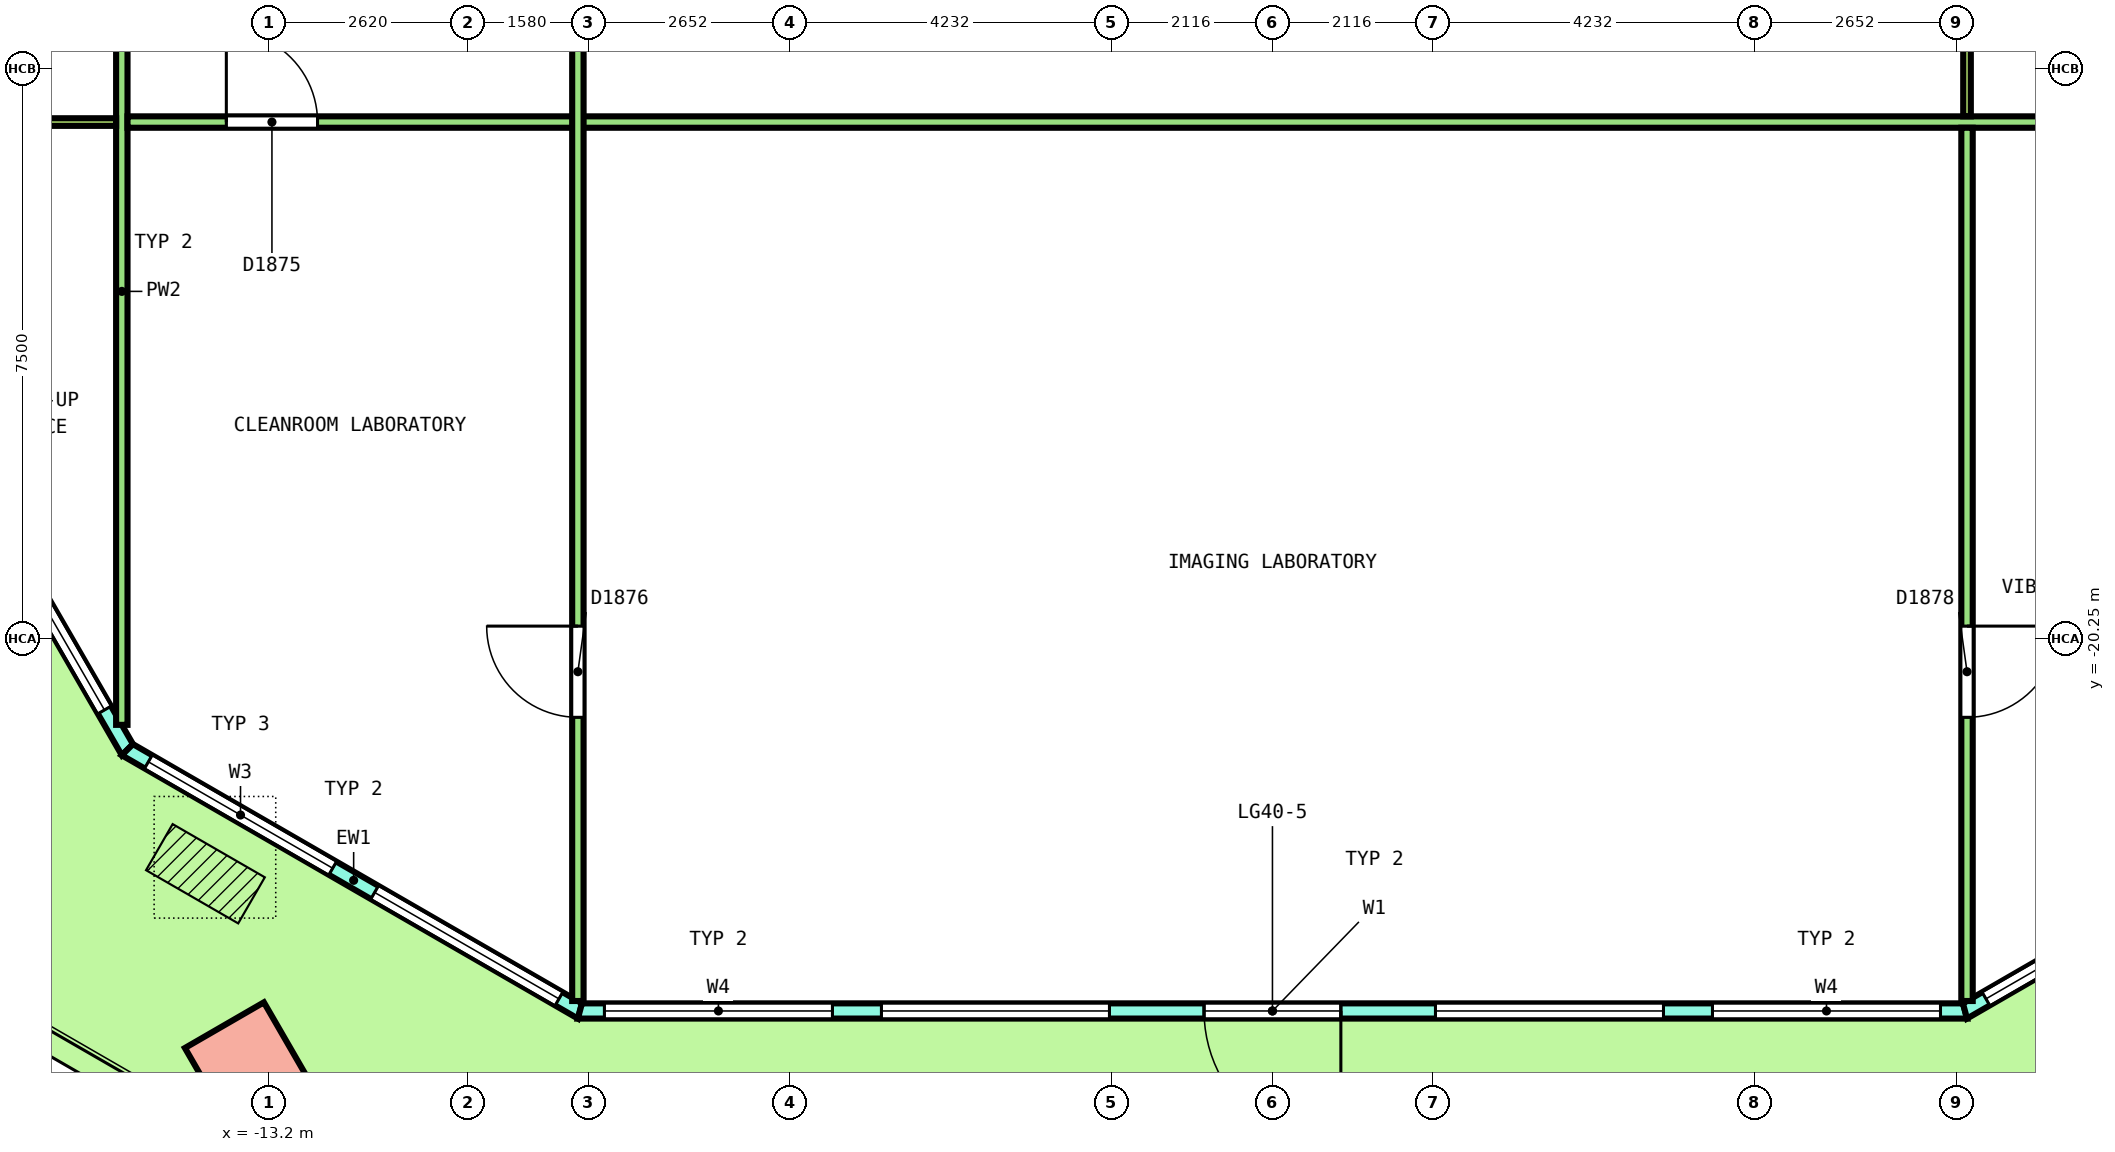
"""IFC4 building model, lengths in metres.
Left out: names, types, materials, properties, quantities, classifications, styles, units other than length and angle.
Written with IfcOpenShell. Run it as: python <this file> out.ifc"""

import sys

from ifc_helpers import new_model, si_unit, direction, frame, frame_2d, origin, origin_2d, place, context, subcontext, project, spatial, polyline, rectangle, outline, extrude, element, fill, save


model = new_model("IFC4")
c1 = context("Model", 3, precision=1e-05, world=origin(), true_north=direction((0.0, 1.0)))
c2 = subcontext(c1, "Body", "Model", "MODEL_VIEW")
j1 = project(units=[si_unit("LENGTHUNIT", "METRE"), si_unit("PLANEANGLEUNIT", "RADIAN")], contexts=[c1])
p1 = place(None, origin())
s1 = spatial("IfcSite", under=j1, at=p1, CompositionType="ELEMENT")
p2 = place(p1, origin())
s2 = spatial("IfcBuilding", under=s1, at=p2, CompositionType="ELEMENT")
p3 = place(p2, frame((0.0, 0.0, 184.8)))
s3 = spatial("IfcBuildingStorey", under=s2, at=p3, CompositionType="ELEMENT", Elevation=184.8)
p4 = place(p3, frame((-13.488, -25.851, 0.0), z_axis=(0.018132595726, -0.031445896907, 0.999340965106), x_axis=(0.865740985748, -0.499504693256, -0.031426215359)))
e1 = element("IfcColumn", 1, at=p4, inside=s3, PredefinedType="COLUMN", context=c2, shape_type="SweptSolid", body=[
    extrude(rectangle(XDim=1.2, YDim=1.2, at=origin_2d()), origin(), (0.0, 0.0, 1.0), 4.053),
])
p5 = place(p3, frame((-26.331, -2.193, 0.0), z_axis=(0.0, 0.0, 1.0), x_axis=(0.499998501835, -0.866026268748, 0.0)))
e2 = element("IfcWall", 2, at=p5, inside=s3, PredefinedType="SOLIDWALL", context=c2, shape_type="SweptSolid", body=[
    extrude(outline(polyline([(-0.027, -0.1), (1.0, -0.1), (2.027, -0.1), (3.053, -0.1), (4.08, -0.1), (5.106, -0.1), (6.133, -0.1), (7.16, -0.1), (8.187, -0.1), (9.213, -0.1), (10.24, -0.1), (11.267, -0.1), (12.293, -0.1), (13.32, -0.1), (14.347, -0.1), (15.373, -0.1), (16.4, -0.1), (17.427, -0.1), (18.453, -0.1), (19.48, -0.1), (20.507, -0.1), (21.533, -0.1), (22.56, -0.1), (22.506, 0.1), (21.485, 0.1), (20.463, 0.1), (19.441, 0.1), (18.419, 0.1), (17.397, 0.1), (16.375, 0.1), (15.354, 0.1), (14.332, 0.1), (13.31, 0.1), (12.288, 0.1), (11.267, 0.1), (10.245, 0.1), (9.223, 0.1), (8.201, 0.1), (7.179, 0.1), (6.158, 0.1), (5.136, 0.1), (4.114, 0.1), (3.092, 0.1), (2.071, 0.1), (1.049, 0.1), (0.027, 0.1), (-0.027, -0.1)])), origin(), (0.0, 0.0, 1.0), 4.1),
])
p6 = place(p5, frame((0.603, 0.0, 0.1)))
e3 = element("IfcOpeningElement", 3, at=p6, cuts=e2, PredefinedType="OPENING", context=c2, shape_type="SweptSolid", body=[
    extrude(rectangle(XDim=3.3, YDim=2.9, at=frame_2d((1.65, 1.45))), frame((0.0, 0.11, 0.0), z_axis=(0.0, -1.0, 0.0), x_axis=(1.0, 0.0, 0.0)), (0.0, 0.0, 1.0), 0.22),
])
p7 = place(p5, frame((5.11, 0.0, 0.1)))
e4 = element("IfcOpeningElement", 4, at=p7, cuts=e2, PredefinedType="OPENING", context=c2, shape_type="SweptSolid", body=[
    extrude(rectangle(XDim=3.3, YDim=2.9, at=frame_2d((1.65, 1.45))), frame((0.0, 0.11, 0.0), z_axis=(0.0, -1.0, 0.0), x_axis=(1.0, 0.0, 0.0)), (0.0, 0.0, 1.0), 0.22),
])
p8 = place(p5, frame((10.367, 0.0, 0.0)))
e5 = element("IfcOpeningElement", 5, at=p8, cuts=e2, PredefinedType="OPENING", context=c2, shape_type="SweptSolid", body=[
    extrude(rectangle(XDim=1.8, YDim=2.4, at=frame_2d((0.9, 1.2))), frame((0.0, 0.11, 0.0), z_axis=(0.0, -1.0, 0.0), x_axis=(1.0, 0.0, 0.0)), (0.0, 0.0, 1.0), 0.22),
])
p9 = place(p5, frame((10.367, 0.0, 2.55)))
e6 = element("IfcOpeningElement", 6, at=p9, cuts=e2, PredefinedType="OPENING", context=c2, shape_type="SweptSolid", body=[
    extrude(rectangle(XDim=1.8, YDim=0.45, at=frame_2d((0.9, 0.225))), frame((0.0, 0.11, 0.0), z_axis=(0.0, -1.0, 0.0), x_axis=(1.0, 0.0, 0.0)), (0.0, 0.0, 1.0), 0.22),
])
p10 = place(p5, frame((14.123, 0.0, 0.1)))
e7 = element("IfcOpeningElement", 7, at=p10, cuts=e2, PredefinedType="OPENING", context=c2, shape_type="SweptSolid", body=[
    extrude(rectangle(XDim=3.3, YDim=2.9, at=frame_2d((1.65, 1.45))), frame((0.0, 0.11, 0.0), z_axis=(0.0, -1.0, 0.0), x_axis=(1.0, 0.0, 0.0)), (0.0, 0.0, 1.0), 0.22),
])
p11 = place(p5, frame((18.63, 0.0, 0.1)))
e8 = element("IfcOpeningElement", 8, at=p11, cuts=e2, PredefinedType="OPENING", context=c2, shape_type="SweptSolid", body=[
    extrude(rectangle(XDim=3.3, YDim=2.9, at=frame_2d((1.65, 1.45))), frame((0.0, 0.11, 0.0), z_axis=(0.0, -1.0, 0.0), x_axis=(1.0, 0.0, 0.0)), (0.0, 0.0, 1.0), 0.22),
])
p12 = place(p3, frame((-15.065, -21.707, 0.0), z_axis=(0.0, 0.0, 1.0), x_axis=(0.866029458321, -0.49999297727, 0.0)))
e9 = element("IfcWall", 9, at=p12, inside=s3, PredefinedType="SOLIDWALL", context=c2, shape_type="SweptSolid", body=[
    extrude(outline(polyline([(-0.027, -0.1), (1.128, -0.1), (2.282, -0.1), (3.437, -0.1), (4.592, -0.1), (5.747, -0.1), (6.901, -0.1), (6.848, 0.1), (5.711, 0.1), (4.574, 0.1), (3.437, 0.1), (2.301, 0.1), (1.164, 0.1), (0.027, 0.1), (-0.027, -0.1)])), origin(), (0.0, 0.0, 1.0), 4.1),
])
p13 = place(p12, frame((0.319, 0.0, 0.1)))
e10 = element("IfcOpeningElement", 10, at=p13, cuts=e9, PredefinedType="OPENING", context=c2, shape_type="SweptSolid", body=[
    extrude(rectangle(XDim=2.8, YDim=2.9, at=frame_2d((1.4, 1.45))), frame((0.0, 0.11, 0.0), z_axis=(0.0, -1.0, 0.0), x_axis=(1.0, 0.0, 0.0)), (0.0, 0.0, 1.0), 0.22),
])
p14 = place(p12, frame((3.756, 0.0, 0.1)))
e11 = element("IfcOpeningElement", 11, at=p14, cuts=e9, PredefinedType="OPENING", context=c2, shape_type="SweptSolid", body=[
    extrude(rectangle(XDim=2.8, YDim=2.9, at=frame_2d((1.4, 1.45))), frame((0.0, 0.11, 0.0), z_axis=(0.0, -1.0, 0.0), x_axis=(1.0, 0.0, 0.0)), (0.0, 0.0, 1.0), 0.22),
])
p15 = place(p3, frame((-9.111, -25.145, 0.0), z_axis=(0.0, 0.0, 1.0), x_axis=(1.0, 0.0, 0.0)))
e12 = element("IfcWall", 12, at=p15, inside=s3, PredefinedType="SOLIDWALL", context=c2, shape_type="SweptSolid", body=[
    extrude(outline(polyline([(-0.027, -0.1), (0.989, -0.1), (2.004, -0.1), (3.019, -0.1), (4.034, -0.1), (5.05, -0.1), (6.065, -0.1), (7.08, -0.1), (8.096, -0.1), (9.111, -0.1), (10.126, -0.1), (11.142, -0.1), (12.157, -0.1), (13.172, -0.1), (14.188, -0.1), (15.203, -0.1), (16.218, -0.1), (17.234, -0.1), (18.249, -0.1), (18.195, 0.1), (17.186, 0.1), (16.177, 0.1), (15.167, 0.1), (14.158, 0.1), (13.148, 0.1), (12.139, 0.1), (11.13, 0.1), (10.12, 0.1), (9.111, 0.1), (8.102, 0.1), (7.092, 0.1), (6.083, 0.1), (5.074, 0.1), (4.064, 0.1), (3.055, 0.1), (2.046, 0.1), (1.036, 0.1), (0.027, 0.1), (-0.027, -0.1)])), origin(), (0.0, 0.0, 1.0), 4.1),
])
p16 = place(p15, frame((0.322, 0.0, 0.1)))
e13 = element("IfcOpeningElement", 13, at=p16, cuts=e12, PredefinedType="OPENING", context=c2, shape_type="SweptSolid", body=[
    extrude(rectangle(XDim=3.0, YDim=2.9, at=frame_2d((1.5, 1.45))), frame((0.0, 0.11, 0.0), z_axis=(0.0, -1.0, 0.0), x_axis=(1.0, 0.0, 0.0)), (0.0, 0.0, 1.0), 0.22),
])
p17 = place(p15, frame((3.967, 0.0, 0.1)))
e14 = element("IfcOpeningElement", 14, at=p17, cuts=e12, PredefinedType="OPENING", context=c2, shape_type="SweptSolid", body=[
    extrude(rectangle(XDim=3.0, YDim=2.9, at=frame_2d((1.5, 1.45))), frame((0.0, 0.11, 0.0), z_axis=(0.0, -1.0, 0.0), x_axis=(1.0, 0.0, 0.0)), (0.0, 0.0, 1.0), 0.22),
])
p18 = place(p15, frame((8.211, 0.0, 0.0)))
e15 = element("IfcOpeningElement", 15, at=p18, cuts=e12, PredefinedType="OPENING", context=c2, shape_type="SweptSolid", body=[
    extrude(rectangle(XDim=1.8, YDim=2.4, at=frame_2d((0.9, 1.2))), frame((0.0, 0.11, 0.0), z_axis=(0.0, -1.0, 0.0), x_axis=(1.0, 0.0, 0.0)), (0.0, 0.0, 1.0), 0.22),
])
p19 = place(p15, frame((8.211, 0.0, 2.55)))
e16 = element("IfcOpeningElement", 16, at=p19, cuts=e12, PredefinedType="OPENING", context=c2, shape_type="SweptSolid", body=[
    extrude(rectangle(XDim=1.8, YDim=0.45, at=frame_2d((0.9, 0.225))), frame((0.0, 0.11, 0.0), z_axis=(0.0, -1.0, 0.0), x_axis=(1.0, 0.0, 0.0)), (0.0, 0.0, 1.0), 0.22),
])
p20 = place(p15, frame((11.256, 0.0, 0.1)))
e17 = element("IfcOpeningElement", 17, at=p20, cuts=e12, PredefinedType="OPENING", context=c2, shape_type="SweptSolid", body=[
    extrude(rectangle(XDim=3.0, YDim=2.9, at=frame_2d((1.5, 1.45))), frame((0.0, 0.11, 0.0), z_axis=(0.0, -1.0, 0.0), x_axis=(1.0, 0.0, 0.0)), (0.0, 0.0, 1.0), 0.22),
])
p21 = place(p15, frame((14.9, 0.0, 0.1)))
e18 = element("IfcOpeningElement", 18, at=p21, cuts=e12, PredefinedType="OPENING", context=c2, shape_type="SweptSolid", body=[
    extrude(rectangle(XDim=3.0, YDim=2.9, at=frame_2d((1.5, 1.45))), frame((0.0, 0.11, 0.0), z_axis=(0.0, -1.0, 0.0), x_axis=(1.0, 0.0, 0.0)), (0.0, 0.0, 1.0), 0.22),
])
p22 = place(p3, frame((9.111, -25.145, 0.0), z_axis=(0.0, 0.0, 1.0), x_axis=(0.866029458321, 0.49999297727, 0.0)))
e19 = element("IfcWall", 19, at=p22, inside=s3, PredefinedType="SOLIDWALL", context=c2, shape_type="SweptSolid", body=[
    extrude(outline(polyline([(-0.027, -0.1), (1.128, -0.1), (2.282, -0.1), (3.437, -0.1), (4.592, -0.1), (5.747, -0.1), (6.901, -0.1), (6.848, 0.1), (5.711, 0.1), (4.574, 0.1), (3.437, 0.1), (2.301, 0.1), (1.164, 0.1), (0.027, 0.1), (-0.027, -0.1)])), origin(), (0.0, 0.0, 1.0), 4.1),
])
p23 = place(p22, frame((0.319, 0.0, 0.1)))
e20 = element("IfcOpeningElement", 20, at=p23, cuts=e19, PredefinedType="OPENING", context=c2, shape_type="SweptSolid", body=[
    extrude(rectangle(XDim=2.8, YDim=2.9, at=frame_2d((1.4, 1.45))), frame((0.0, 0.11, 0.0), z_axis=(0.0, -1.0, 0.0), x_axis=(1.0, 0.0, 0.0)), (0.0, 0.0, 1.0), 0.22),
])
p24 = place(p22, frame((3.756, 0.0, 0.1)))
e21 = element("IfcOpeningElement", 21, at=p24, cuts=e19, PredefinedType="OPENING", context=c2, shape_type="SweptSolid", body=[
    extrude(rectangle(XDim=2.8, YDim=2.9, at=frame_2d((1.4, 1.45))), frame((0.0, 0.11, 0.0), z_axis=(0.0, -1.0, 0.0), x_axis=(1.0, 0.0, 0.0)), (0.0, 0.0, 1.0), 0.22),
])
p25 = place(p3, frame((-15.138, -21.38, 0.0), z_axis=(0.0, 0.0, 1.0), x_axis=(0.0, 1.0, 0.0)))
e22 = element("IfcWall", 22, at=p25, inside=s3, PredefinedType="PARTITIONING", context=c2, shape_type="SweptSolid", body=[
    extrude(rectangle(XDim=11.405, YDim=0.15, at=frame_2d((5.703, 0.0))), origin(), (0.0, 0.0, 1.0), 3.05),
])
p26 = place(p3, frame((-15.063, -13.45, 0.0), z_axis=(0.0, 0.0, 1.0), x_axis=(1.0, 0.0, 0.0)))
e23 = element("IfcWall", 23, at=p26, inside=s3, PredefinedType="PARTITIONING", context=c2, shape_type="SweptSolid", body=[
    extrude(rectangle(XDim=31.115, YDim=0.15, at=frame_2d((15.558, 0.0))), origin(), (0.0, 0.0, 1.0), 3.05),
])
p27 = place(p26, frame((1.3, 0.0, 0.0)))
e24 = element("IfcOpeningElement", 24, at=p27, cuts=e23, PredefinedType="OPENING", context=c2, shape_type="SweptSolid", body=[
    extrude(rectangle(XDim=1.2, YDim=2.1, at=frame_2d((0.6, 1.05))), frame((0.0, 0.085, 0.0), z_axis=(0.0, -1.0, 0.0), x_axis=(1.0, 0.0, 0.0)), (0.0, 0.0, 1.0), 0.17),
])
p28 = place(p3, frame((-9.138, -25.013, 0.0), z_axis=(0.0, 0.0, 1.0), x_axis=(0.0, 1.0, 0.0)))
e25 = element("IfcWall", 25, at=p28, inside=s3, PredefinedType="PARTITIONING", context=c2, shape_type="SweptSolid", body=[
    extrude(rectangle(XDim=14.888, YDim=0.15, at=frame_2d((7.444, 0.0))), origin(), (0.0, 0.0, 1.0), 3.05),
])
p29 = place(p28, frame((3.732, 0.0, 0.0)))
e26 = element("IfcOpeningElement", 26, at=p29, cuts=e25, PredefinedType="OPENING", context=c2, shape_type="SweptSolid", body=[
    extrude(rectangle(XDim=1.2, YDim=2.1, at=frame_2d((0.6, 1.05))), frame((0.0, 0.085, 0.0), z_axis=(0.0, -1.0, 0.0), x_axis=(1.0, 0.0, 0.0)), (0.0, 0.0, 1.0), 0.17),
])
p30 = place(p3, frame((9.138, -25.013, 0.0), z_axis=(0.0, 0.0, 1.0), x_axis=(0.0, 1.0, 0.0)))
e27 = element("IfcWall", 27, at=p30, inside=s3, PredefinedType="PARTITIONING", context=c2, shape_type="SweptSolid", body=[
    extrude(rectangle(XDim=11.489, YDim=0.15, at=frame_2d((5.744, 0.0))), origin(), (0.0, 0.0, 1.0), 3.05),
])
p31 = place(p30, frame((3.732, 0.0, 0.0)))
e28 = element("IfcOpeningElement", 28, at=p31, cuts=e27, PredefinedType="OPENING", context=c2, shape_type="SweptSolid", body=[
    extrude(rectangle(XDim=1.2, YDim=2.1, at=frame_2d((0.6, 1.05))), frame((0.0, 0.085, 0.0), z_axis=(0.0, -1.0, 0.0), x_axis=(1.0, 0.0, 0.0)), (0.0, 0.0, 1.0), 0.17),
])
p32 = place(p3, frame((-18.5, -13.45, 0.0), z_axis=(0.0, 0.0, 1.0), x_axis=(1.0, 0.0, 0.0)))
e29 = element("IfcWall", 29, at=p32, inside=s3, PredefinedType="PARTITIONING", context=c2, shape_type="SweptSolid", body=[
    extrude(rectangle(XDim=3.287, YDim=0.1, at=frame_2d((1.644, 0.0))), origin(), (0.0, 0.0, 1.0), 4.1),
])
p33 = place(p3, frame((9.138, -13.375, 0.0), z_axis=(0.0, 0.0, 1.0), x_axis=(0.0, 1.0, 0.0)))
e30 = element("IfcWall", 30, at=p33, inside=s3, PredefinedType="PARTITIONING", context=c2, shape_type="SweptSolid", body=[
    extrude(rectangle(XDim=3.25, YDim=0.1, at=frame_2d((1.625, 0.0))), origin(), (0.0, 0.0, 1.0), 3.05),
])
p34 = place(p11, origin())
e31 = element("IfcWindow", 31, at=p34, inside=s3, PartitioningType="SINGLE_PANEL", PredefinedType="WINDOW", context=c2, shape_type="SweptSolid", body=[
    extrude(rectangle(XDim=3.3, YDim=2.9, at=frame_2d((1.65, 1.45))), frame((0.0, 0.03, 0.0), z_axis=(0.0, -1.0, 0.0), x_axis=(1.0, 0.0, 0.0)), (0.0, 0.0, 1.0), 0.06),
])
fill(e8, e31)
p35 = place(p13, origin())
e32 = element("IfcWindow", 32, at=p35, inside=s3, PartitioningType="SINGLE_PANEL", PredefinedType="WINDOW", context=c2, shape_type="SweptSolid", body=[
    extrude(rectangle(XDim=2.8, YDim=2.9, at=frame_2d((1.4, 1.45))), frame((0.0, 0.03, 0.0), z_axis=(0.0, -1.0, 0.0), x_axis=(1.0, 0.0, 0.0)), (0.0, 0.0, 1.0), 0.06),
])
fill(e10, e32)
p36 = place(p14, origin())
e33 = element("IfcWindow", 33, at=p36, inside=s3, PartitioningType="SINGLE_PANEL", PredefinedType="WINDOW", context=c2, shape_type="SweptSolid", body=[
    extrude(rectangle(XDim=2.8, YDim=2.9, at=frame_2d((1.4, 1.45))), frame((0.0, 0.03, 0.0), z_axis=(0.0, -1.0, 0.0), x_axis=(1.0, 0.0, 0.0)), (0.0, 0.0, 1.0), 0.06),
])
fill(e11, e33)
p37 = place(p16, origin())
e34 = element("IfcWindow", 34, at=p37, inside=s3, PartitioningType="SINGLE_PANEL", PredefinedType="WINDOW", context=c2, shape_type="SweptSolid", body=[
    extrude(rectangle(XDim=3.0, YDim=2.9, at=frame_2d((1.5, 1.45))), frame((0.0, 0.03, 0.0), z_axis=(0.0, -1.0, 0.0), x_axis=(1.0, 0.0, 0.0)), (0.0, 0.0, 1.0), 0.06),
])
fill(e13, e34)
p38 = place(p17, origin())
e35 = element("IfcWindow", 35, at=p38, inside=s3, PartitioningType="SINGLE_PANEL", PredefinedType="WINDOW", context=c2, shape_type="SweptSolid", body=[
    extrude(rectangle(XDim=3.0, YDim=2.9, at=frame_2d((1.5, 1.45))), frame((0.0, 0.03, 0.0), z_axis=(0.0, -1.0, 0.0), x_axis=(1.0, 0.0, 0.0)), (0.0, 0.0, 1.0), 0.06),
])
fill(e14, e35)
p39 = place(p18, origin())
e36 = element("IfcDoor", 36, at=p39, inside=s3, OperationType="DOUBLE_DOOR_SINGLE_SWING", PredefinedType="DOOR", context=c2, shape_type="SweptSolid", body=[
    extrude(rectangle(XDim=1.8, YDim=2.4, at=frame_2d((0.9, 1.2))), frame((0.0, 0.025, 0.0), z_axis=(0.0, -1.0, 0.0), x_axis=(1.0, 0.0, 0.0)), (0.0, 0.0, 1.0), 0.05),
])
fill(e15, e36)
p40 = place(p19, origin())
e37 = element("IfcWindow", 37, at=p40, inside=s3, PartitioningType="SINGLE_PANEL", PredefinedType="WINDOW", context=c2, shape_type="SweptSolid", body=[
    extrude(rectangle(XDim=1.8, YDim=0.45, at=frame_2d((0.9, 0.225))), frame((0.0, 0.03, 0.0), z_axis=(0.0, -1.0, 0.0), x_axis=(1.0, 0.0, 0.0)), (0.0, 0.0, 1.0), 0.06),
])
fill(e16, e37)
p41 = place(p20, origin())
e38 = element("IfcWindow", 38, at=p41, inside=s3, PartitioningType="SINGLE_PANEL", PredefinedType="WINDOW", context=c2, shape_type="SweptSolid", body=[
    extrude(rectangle(XDim=3.0, YDim=2.9, at=frame_2d((1.5, 1.45))), frame((0.0, 0.03, 0.0), z_axis=(0.0, -1.0, 0.0), x_axis=(1.0, 0.0, 0.0)), (0.0, 0.0, 1.0), 0.06),
])
fill(e17, e38)
p42 = place(p21, origin())
e39 = element("IfcWindow", 39, at=p42, inside=s3, PartitioningType="SINGLE_PANEL", PredefinedType="WINDOW", context=c2, shape_type="SweptSolid", body=[
    extrude(rectangle(XDim=3.0, YDim=2.9, at=frame_2d((1.5, 1.45))), frame((0.0, 0.03, 0.0), z_axis=(0.0, -1.0, 0.0), x_axis=(1.0, 0.0, 0.0)), (0.0, 0.0, 1.0), 0.06),
])
fill(e18, e39)
p43 = place(p23, origin())
e40 = element("IfcWindow", 40, at=p43, inside=s3, PartitioningType="SINGLE_PANEL", PredefinedType="WINDOW", context=c2, shape_type="SweptSolid", body=[
    extrude(rectangle(XDim=2.8, YDim=2.9, at=frame_2d((1.4, 1.45))), frame((0.0, 0.03, 0.0), z_axis=(0.0, -1.0, 0.0), x_axis=(1.0, 0.0, 0.0)), (0.0, 0.0, 1.0), 0.06),
])
fill(e20, e40)
p44 = place(p27, origin())
e41 = element("IfcDoor", 41, at=p44, inside=s3, OperationType="DOUBLE_DOOR_SINGLE_SWING", PredefinedType="DOOR", context=c2, shape_type="SweptSolid", body=[
    extrude(rectangle(XDim=1.2, YDim=2.1, at=frame_2d((0.6, 1.05))), frame((0.0, 0.025, 0.0), z_axis=(0.0, -1.0, 0.0), x_axis=(1.0, 0.0, 0.0)), (0.0, 0.0, 1.0), 0.05),
])
fill(e24, e41)
p45 = place(p29, origin())
e42 = element("IfcDoor", 42, at=p45, inside=s3, OperationType="DOUBLE_DOOR_SINGLE_SWING", PredefinedType="DOOR", context=c2, shape_type="SweptSolid", body=[
    extrude(rectangle(XDim=1.2, YDim=2.1, at=frame_2d((0.6, 1.05))), frame((0.0, 0.025, 0.0), z_axis=(0.0, -1.0, 0.0), x_axis=(1.0, 0.0, 0.0)), (0.0, 0.0, 1.0), 0.05),
])
fill(e26, e42)
p46 = place(p31, origin())
e43 = element("IfcDoor", 43, at=p46, inside=s3, OperationType="DOUBLE_DOOR_SINGLE_SWING", PredefinedType="DOOR", context=c2, shape_type="SweptSolid", body=[
    extrude(rectangle(XDim=1.2, YDim=2.1, at=frame_2d((0.6, 1.05))), frame((0.0, 0.025, 0.0), z_axis=(0.0, -1.0, 0.0), x_axis=(1.0, 0.0, 0.0)), (0.0, 0.0, 1.0), 0.05),
])
fill(e28, e43)
save(model, sys.argv[1])
